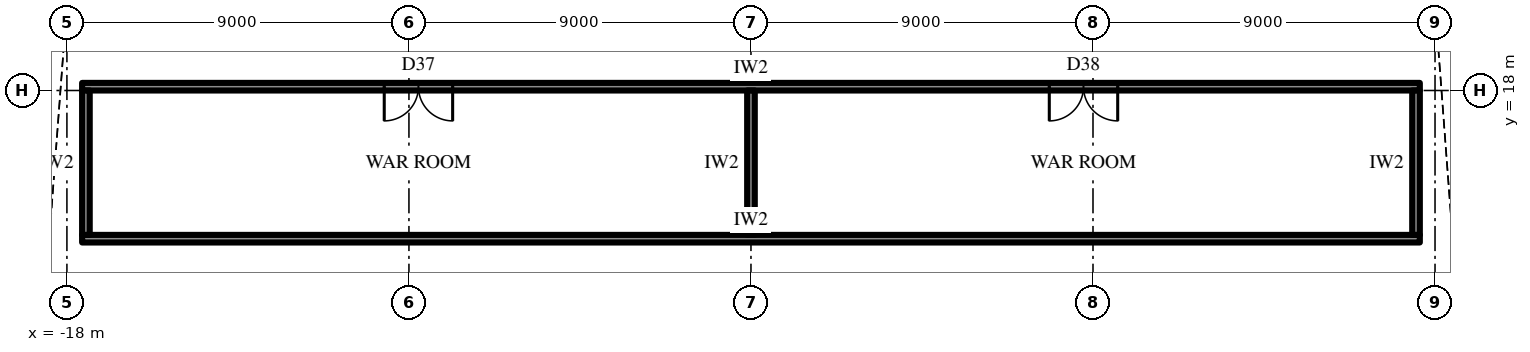
"""IFC4 building model, lengths in metres.
Left out: names, types, materials, properties, quantities, classifications, styles, units other than length and angle.
Written with IfcOpenShell. Run it as: python <this file> out.ifc"""

import sys

from ifc_helpers import new_model, si_unit, direction, frame, frame_2d, origin, place, context, subcontext, project, spatial, rectangle, extrude, element, fill, save


model = new_model("IFC4")
c1 = context("Model", 3, precision=1e-05, world=origin(), true_north=direction((0.0, 1.0)))
c2 = subcontext(c1, "Body", "Model", "MODEL_VIEW")
j1 = project(units=[si_unit("LENGTHUNIT", "METRE"), si_unit("PLANEANGLEUNIT", "RADIAN")], contexts=[c1])
p1 = place(None, origin())
s1 = spatial("IfcSite", under=j1, at=p1, CompositionType="ELEMENT")
p2 = place(p1, origin())
s2 = spatial("IfcBuilding", under=s1, at=p2, CompositionType="ELEMENT")
p3 = place(p2, frame((0.0, 0.0, 148.9)))
s3 = spatial("IfcBuildingStorey", under=s2, at=p3, CompositionType="ELEMENT", Elevation=148.9)
p4 = place(p3, frame((-17.6, 14.1, 0.0), z_axis=(0.0, 0.0, 1.0), x_axis=(1.0, 0.0, 0.0)))
e1 = element("IfcWall", 1, at=p4, inside=s3, PredefinedType="PARTITIONING", context=c2, shape_type="SweptSolid", body=[
    extrude(rectangle(XDim=35.2, YDim=0.2, at=frame_2d((17.6, 0.0))), origin(), (0.0, 0.0, 1.0), 4.0),
])
p5 = place(p3, frame((-17.6, 18.1, 0.0), z_axis=(0.0, 0.0, 1.0), x_axis=(1.0, 0.0, 0.0)))
e2 = element("IfcWall", 2, at=p5, inside=s3, PredefinedType="PARTITIONING", context=c2, shape_type="SweptSolid", body=[
    extrude(rectangle(XDim=35.2, YDim=0.2, at=frame_2d((17.6, 0.0))), origin(), (0.0, 0.0, 1.0), 4.0),
])
p6 = place(p5, frame((7.95, 0.0, 0.0)))
e3 = element("IfcOpeningElement", 3, at=p6, cuts=e2, PredefinedType="OPENING", context=c2, shape_type="SweptSolid", body=[
    extrude(rectangle(XDim=1.8, YDim=2.4, at=frame_2d((0.9, 1.2))), frame((0.0, 0.11, 0.0), z_axis=(0.0, -1.0, 0.0), x_axis=(1.0, 0.0, 0.0)), (0.0, 0.0, 1.0), 0.22),
])
p7 = place(p5, frame((25.45, 0.0, 0.0)))
e4 = element("IfcOpeningElement", 4, at=p7, cuts=e2, PredefinedType="OPENING", context=c2, shape_type="SweptSolid", body=[
    extrude(rectangle(XDim=1.8, YDim=2.4, at=frame_2d((0.9, 1.2))), frame((0.0, 0.11, 0.0), z_axis=(0.0, -1.0, 0.0), x_axis=(1.0, 0.0, 0.0)), (0.0, 0.0, 1.0), 0.22),
])
p8 = place(p3, frame((-17.5, 14.2, 0.0), z_axis=(0.0, 0.0, 1.0), x_axis=(0.0, 1.0, 0.0)))
e5 = element("IfcWall", 5, at=p8, inside=s3, PredefinedType="PARTITIONING", context=c2, shape_type="SweptSolid", body=[
    extrude(rectangle(XDim=3.8, YDim=0.2, at=frame_2d((1.9, 0.0))), origin(), (0.0, 0.0, 1.0), 4.0),
])
p9 = place(p3, frame((0.0, 14.2, 0.0), z_axis=(0.0, 0.0, 1.0), x_axis=(0.0, 1.0, 0.0)))
e6 = element("IfcWall", 6, at=p9, inside=s3, PredefinedType="PARTITIONING", context=c2, shape_type="SweptSolid", body=[
    extrude(rectangle(XDim=3.8, YDim=0.2, at=frame_2d((1.9, 0.0))), origin(), (0.0, 0.0, 1.0), 2.992),
])
p10 = place(p3, frame((17.5, 14.2, 0.0), z_axis=(0.0, 0.0, 1.0), x_axis=(0.0, 1.0, 0.0)))
e7 = element("IfcWall", 7, at=p10, inside=s3, PredefinedType="PARTITIONING", context=c2, shape_type="SweptSolid", body=[
    extrude(rectangle(XDim=3.8, YDim=0.2, at=frame_2d((1.9, 0.0))), origin(), (0.0, 0.0, 1.0), 4.0),
])
p11 = place(p6, frame((1.8, 0.0, 0.0), z_axis=(0.0, 0.0, 1.0), x_axis=(-1.0, 0.0, 0.0)))
e8 = element("IfcDoor", 8, at=p11, inside=s3, OperationType="DOUBLE_DOOR_SINGLE_SWING", PredefinedType="DOOR", context=c2, shape_type="SweptSolid", body=[
    extrude(rectangle(XDim=1.8, YDim=2.4, at=frame_2d((0.9, 1.2))), frame((0.0, 0.025, 0.0), z_axis=(0.0, -1.0, 0.0), x_axis=(1.0, 0.0, 0.0)), (0.0, 0.0, 1.0), 0.05),
])
fill(e3, e8)
p12 = place(p7, frame((1.8, 0.0, 0.0), z_axis=(0.0, 0.0, 1.0), x_axis=(-1.0, 0.0, 0.0)))
e9 = element("IfcDoor", 9, at=p12, inside=s3, OperationType="DOUBLE_DOOR_SINGLE_SWING", PredefinedType="DOOR", context=c2, shape_type="SweptSolid", body=[
    extrude(rectangle(XDim=1.8, YDim=2.4, at=frame_2d((0.9, 1.2))), frame((0.0, 0.025, 0.0), z_axis=(0.0, -1.0, 0.0), x_axis=(1.0, 0.0, 0.0)), (0.0, 0.0, 1.0), 0.05),
])
fill(e4, e9)
save(model, sys.argv[1])
